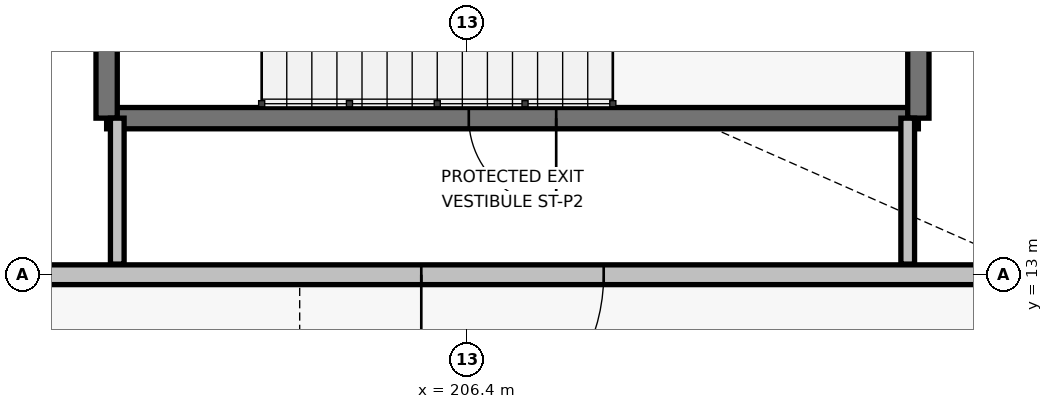
"""IFC4 building model, lengths in metres.
Left out: names, types, materials, properties, quantities, classifications, styles, units other than length and angle.
Written with IfcOpenShell. Run it as: python <this file> out.ifc"""

import sys

from ifc_helpers import new_model, si_unit, direction, frame, frame_2d, origin, place, context, subcontext, project, spatial, rectangle, extrude, element, fill, save


model = new_model("IFC4")
c1 = context("Model", 3, precision=1e-05, world=origin(), true_north=direction((0.0, 1.0)))
c2 = subcontext(c1, "Body", "Model", "MODEL_VIEW")
j1 = project(units=[si_unit("LENGTHUNIT", "METRE"), si_unit("PLANEANGLEUNIT", "RADIAN")], contexts=[c1])
p1 = place(None, origin())
s1 = spatial("IfcSite", under=j1, at=p1, CompositionType="ELEMENT")
p2 = place(p1, origin())
s2 = spatial("IfcBuilding", under=s1, at=p2, CompositionType="ELEMENT")
p3 = place(p2, origin())
s3 = spatial("IfcBuildingStorey", under=s2, at=p3, CompositionType="ELEMENT", Elevation=0.0)
p4 = place(p3, frame((199.85, 13.0, 0.0), z_axis=(0.0, 0.0, 1.0), x_axis=(1.0, 0.0, 0.0)))
e1 = element("IfcWall", 1, at=p4, inside=s3, PredefinedType="STANDARD", context=c2, shape_type="SweptSolid", body=[
    extrude(rectangle(XDim=14.15, YDim=0.26, at=frame_2d((7.075, 0.0))), origin(), (0.0, 0.0, 1.0), 4.625),
])
p5 = place(p4, frame((8.35, 0.0, 0.0), z_axis=(0.0, 0.0, 1.0), x_axis=(-1.0, 0.0, 0.0)))
e2 = element("IfcOpeningElement", 2, at=p5, cuts=e1, PredefinedType="OPENING", context=c2, shape_type="SweptSolid", body=[
    extrude(rectangle(XDim=2.4, YDim=2.4, at=frame_2d((1.2, 1.2))), frame((0.0, 0.14, 0.0), z_axis=(0.0, -1.0, 0.0), x_axis=(1.0, 0.0, 0.0)), (0.0, 0.0, 1.0), 0.28),
])
p6 = place(p3, frame((201.66, 15.06, -0.45), z_axis=(0.0, 0.0, 1.0), x_axis=(1.0, 0.0, 0.0)))
e3 = element("IfcWall", 3, at=p6, inside=s3, PredefinedType="SHEAR", context=c2, shape_type="SweptSolid", body=[
    extrude(rectangle(XDim=10.68, YDim=0.28, at=frame_2d((5.34, 0.0))), origin(), (0.0, 0.0, 1.0), 5.63),
])
p7 = place(p6, frame((4.765, 0.0, 0.45)))
e4 = element("IfcOpeningElement", 4, at=p7, cuts=e3, PredefinedType="OPENING", context=c2, shape_type="SweptSolid", body=[
    extrude(rectangle(XDim=1.15, YDim=2.2, at=frame_2d((0.575, 1.1))), frame((0.0, 0.15, 0.0), z_axis=(0.0, -1.0, 0.0), x_axis=(1.0, 0.0, 0.0)), (0.0, 0.0, 1.0), 0.3),
])
for number, where, z_axis, x_axis in (
    (5, (212.34, 15.06, -0.45), (0.0, 0.0, 1.0), (0.0, 1.0, 0.0)),
    (6, (201.66, 19.34, -0.45), (0.0, 0.0, 1.0), (0.0, -1.0, 0.0)),
):
    element("IfcWall", number, at=place(p3, frame(where, z_axis=z_axis, x_axis=x_axis)), inside=s3, PredefinedType="SHEAR", context=c2, shape_type="SweptSolid", body=[
        extrude(rectangle(XDim=4.28, YDim=0.28, at=frame_2d((2.14, 0.0))), origin(), (0.0, 0.0, 1.0), 5.63),
    ])
for number, where, z_axis, x_axis in (
    (7, (212.2, 13.14, 0.0), (0.0, 0.0, 1.0), (0.0, 1.0, 0.0)),
    (8, (201.8, 15.06, 0.0), (0.0, 0.0, 1.0), (0.0, -1.0, 0.0)),
):
    element("IfcWall", number, at=place(p3, frame(where, z_axis=z_axis, x_axis=x_axis)), inside=s3, PredefinedType="PARTITIONING", context=c2, shape_type="SweptSolid", body=[
        extrude(rectangle(XDim=1.92, YDim=0.18, at=frame_2d((0.96, 0.0))), origin(), (0.0, 0.0, 1.0), 5.16),
    ])
p8 = place(p5, origin())
e9 = element("IfcDoor", 9, at=p8, inside=s3, OperationType="SINGLE_SWING_LEFT", PredefinedType="DOOR", context=c2, shape_type="SweptSolid", body=[
    extrude(rectangle(XDim=2.4, YDim=2.4, at=frame_2d((1.2, 1.2))), frame((0.0, 0.025, 0.0), z_axis=(0.0, -1.0, 0.0), x_axis=(1.0, 0.0, 0.0)), (0.0, 0.0, 1.0), 0.05),
])
fill(e2, e9)
p9 = place(p7, origin())
e10 = element("IfcDoor", 10, at=p9, inside=s3, OperationType="SINGLE_SWING_RIGHT", PredefinedType="DOOR", context=c2, shape_type="SweptSolid", body=[
    extrude(rectangle(XDim=1.15, YDim=2.2, at=frame_2d((0.575, 1.1))), frame((0.0, 0.025, 0.0), z_axis=(0.0, -1.0, 0.0), x_axis=(1.0, 0.0, 0.0)), (0.0, 0.0, 1.0), 0.05),
])
fill(e4, e10)
save(model, sys.argv[1])
